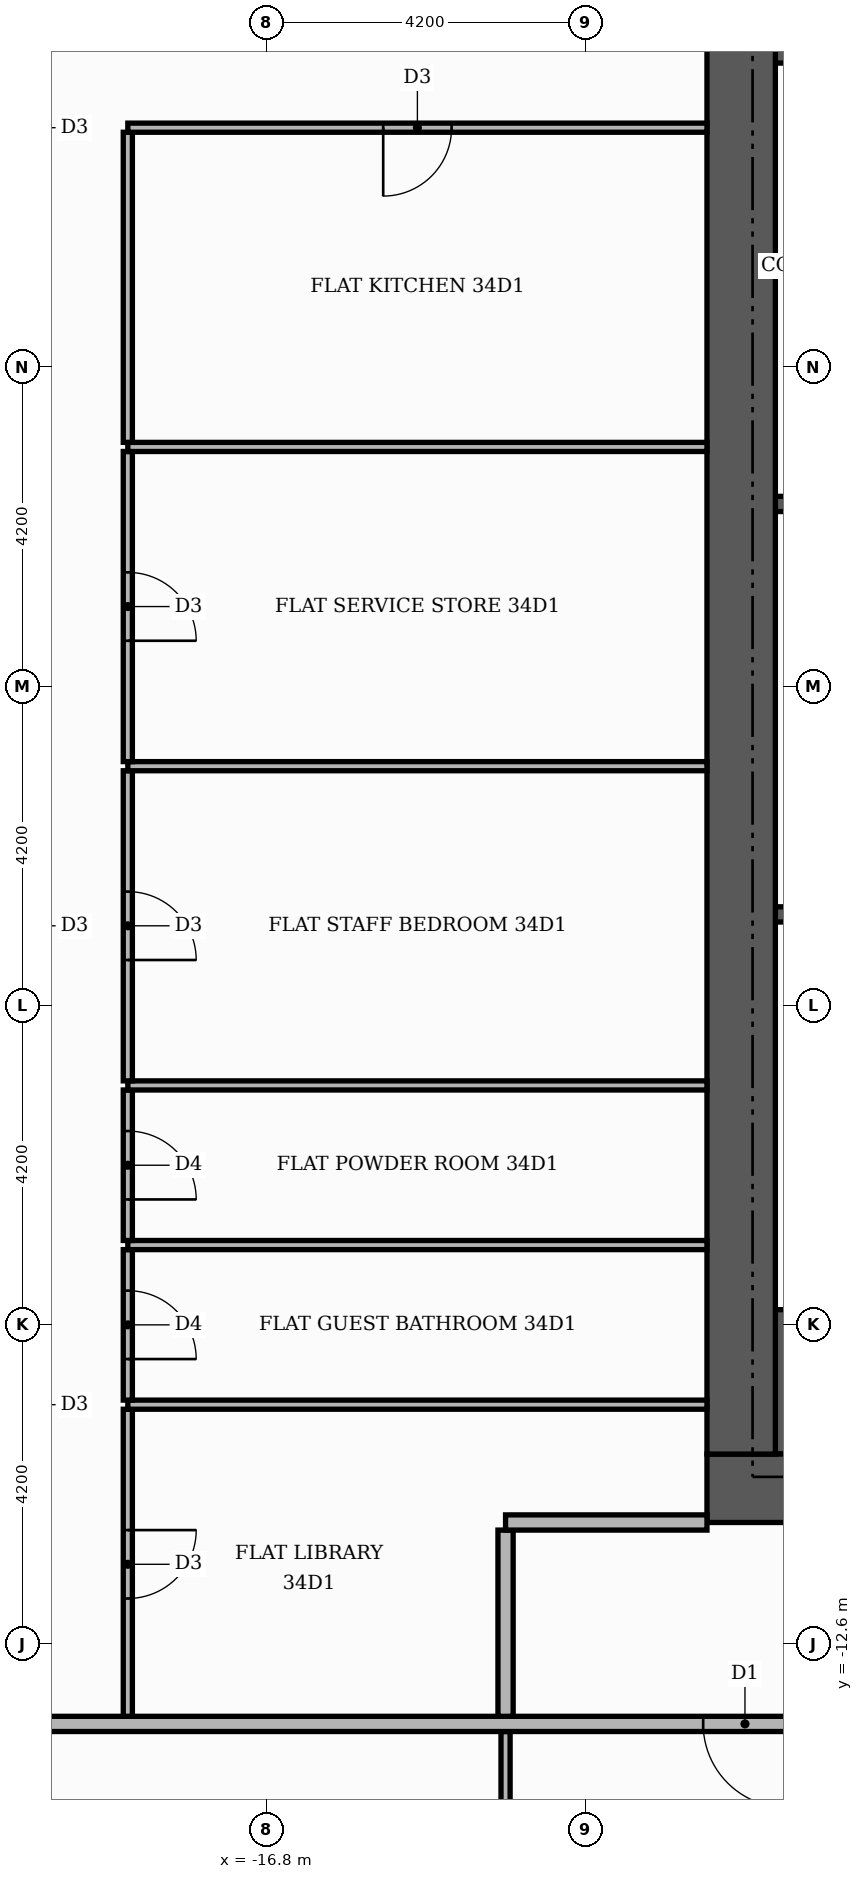
"""IFC4 building model, lengths in metres.
Left out: names, types, materials, properties, quantities, classifications, styles, units other than length and angle.
Written with IfcOpenShell. Run it as: python <this file> out.ifc"""

import sys

from ifc_helpers import new_model, si_unit, direction, frame, frame_2d, origin, place, context, subcontext, project, spatial, rectangle, extrude, element, fill, save


model = new_model("IFC4")
c1 = context("Model", 3, precision=1e-05, world=origin(), true_north=direction((0.0, 1.0)))
c2 = subcontext(c1, "Body", "Model", "MODEL_VIEW")
j1 = project(units=[si_unit("LENGTHUNIT", "METRE"), si_unit("PLANEANGLEUNIT", "RADIAN")], contexts=[c1])
p1 = place(None, origin())
s1 = spatial("IfcSite", under=j1, at=p1, CompositionType="ELEMENT")
p2 = place(p1, origin())
s2 = spatial("IfcBuilding", under=s1, at=p2, CompositionType="ELEMENT")
p3 = place(p2, frame((0.0, 0.0, 145.5)))
s3 = spatial("IfcBuildingStorey", under=s2, at=p3, CompositionType="ELEMENT", Elevation=145.5)
for number, where, z_axis, x_axis in (
    (1, (-10.1, -9.15, 0.0), (0.0, 0.0, 1.0), (1.0, 0.0, 0.0)),
    (2, (-10.1, 9.15, 0.0), (0.0, 0.0, 1.0), (1.0, 0.0, 0.0)),
):
    element("IfcWall", number, at=place(p3, frame(where, z_axis=z_axis, x_axis=x_axis)), inside=s3, PredefinedType="SHEAR", context=c2, shape_type="SweptSolid", body=[
        extrude(rectangle(XDim=4.6, YDim=1.9, at=frame_2d((2.3, 0.0))), origin(), (0.0, 0.0, 1.0), 3.48),
    ])
for number, where, z_axis, x_axis in (
    (3, (-10.1, -3.0, 0.0), (0.0, 0.0, 1.0), (1.0, 0.0, 0.0)),
    (4, (-10.1, 2.4, 0.0), (0.0, 0.0, 1.0), (1.0, 0.0, 0.0)),
):
    element("IfcWall", number, at=place(p3, frame(where, z_axis=z_axis, x_axis=x_axis)), inside=s3, PredefinedType="SHEAR", context=c2, shape_type="SweptSolid", body=[
        extrude(rectangle(XDim=0.9, YDim=0.2, at=frame_2d((0.45, 0.0))), origin(), (0.0, 0.0, 1.0), 3.48),
    ])
p4 = place(p3, frame((-11.0, -10.55, 0.0), z_axis=(0.0, 0.0, 1.0), x_axis=(1.0, 0.0, 0.0)))
e5 = element("IfcWall", 5, at=p4, inside=s3, PredefinedType="SHEAR", context=c2, shape_type="SweptSolid", body=[
    extrude(rectangle(XDim=22.0, YDim=0.9, at=frame_2d((11.0, 0.0))), origin(), (0.0, 0.0, 1.0), 3.48),
])
p5 = place(p4, frame((7.4, 0.0, 0.0)))
e6 = element("IfcOpeningElement", 6, at=p5, cuts=e5, PredefinedType="OPENING", context=c2, shape_type="SweptSolid", body=[
    extrude(rectangle(XDim=1.8, YDim=2.2, at=frame_2d((0.9, 1.1))), frame((0.0, 0.46, 0.0), z_axis=(0.0, -1.0, 0.0), x_axis=(1.0, 0.0, 0.0)), (0.0, 0.0, 1.0), 0.92),
])
p6 = place(p3, frame((-10.55, -10.1, 0.0), z_axis=(0.0, 0.0, 1.0), x_axis=(0.0, 1.0, 0.0)))
e7 = element("IfcWall", 7, at=p6, inside=s3, PredefinedType="SHEAR", context=c2, shape_type="SweptSolid", body=[
    extrude(rectangle(XDim=20.2, YDim=0.9, at=frame_2d((10.1, 0.0))), origin(), (0.0, 0.0, 1.0), 3.48),
])
p7 = place(p3, frame((-13.65, -20.66, 0.0), z_axis=(0.0, 0.0, 1.0), x_axis=(0.0, 1.0, 0.0)))
e8 = element("IfcWall", 8, at=p7, inside=s3, PredefinedType="PARTITIONING", context=c2, shape_type="SweptSolid", body=[
    extrude(rectangle(XDim=6.91, YDim=0.12, at=frame_2d((3.455, 0.0))), origin(), (0.0, 0.0, 1.0), 3.48),
])
p8 = place(p7, frame((3.025, 0.0, 0.0)))
e9 = element("IfcOpeningElement", 9, at=p8, cuts=e8, PredefinedType="OPENING", context=c2, shape_type="SweptSolid", body=[
    extrude(rectangle(XDim=0.9, YDim=2.1, at=frame_2d((0.45, 1.05))), frame((0.0, 0.07, 0.0), z_axis=(0.0, -1.0, 0.0), x_axis=(1.0, 0.0, 0.0)), (0.0, 0.0, 1.0), 0.14),
])
p9 = place(p3, frame((-25.42, -13.65, 0.0), z_axis=(0.0, 0.0, 1.0), x_axis=(1.0, 0.0, 0.0)))
e10 = element("IfcWall", 10, at=p9, inside=s3, PredefinedType="PARTITIONING", context=c2, shape_type="SweptSolid", body=[
    extrude(rectangle(XDim=39.07, YDim=0.2, at=frame_2d((19.535, 0.0))), origin(), (0.0, 0.0, 1.0), 3.48),
])
p10 = place(p9, frame((14.37, 0.0, 0.0)))
e11 = element("IfcOpeningElement", 11, at=p10, cuts=e10, PredefinedType="OPENING", context=c2, shape_type="SweptSolid", body=[
    extrude(rectangle(XDim=1.1, YDim=2.4, at=frame_2d((0.55, 1.2))), frame((0.0, 0.11, 0.0), z_axis=(0.0, -1.0, 0.0), x_axis=(1.0, 0.0, 0.0)), (0.0, 0.0, 1.0), 0.22),
])
p11 = place(p3, frame((-18.62, -13.55, 0.0), z_axis=(0.0, 0.0, 1.0), x_axis=(0.0, 1.0, 0.0)))
e12 = element("IfcWall", 12, at=p11, inside=s3, PredefinedType="PARTITIONING", context=c2, shape_type="SweptSolid", body=[
    extrude(rectangle(XDim=4.04, YDim=0.12, at=frame_2d((2.02, 0.0))), origin(), (0.0, 0.0, 1.0), 3.48),
])
p12 = place(p11, frame((1.55, 0.0, 0.0)))
e13 = element("IfcOpeningElement", 13, at=p12, cuts=e12, PredefinedType="OPENING", context=c2, shape_type="SweptSolid", body=[
    extrude(rectangle(XDim=0.9, YDim=2.1, at=frame_2d((0.45, 1.05))), frame((0.0, 0.07, 0.0), z_axis=(0.0, -1.0, 0.0), x_axis=(1.0, 0.0, 0.0)), (0.0, 0.0, 1.0), 0.14),
])
p13 = place(p3, frame((-13.65, -13.55, 0.0), z_axis=(0.0, 0.0, 1.0), x_axis=(0.0, 1.0, 0.0)))
e14 = element("IfcWall", 14, at=p13, inside=s3, PredefinedType="PARTITIONING", context=c2, shape_type="SweptSolid", body=[
    extrude(rectangle(XDim=2.45, YDim=0.2, at=frame_2d((1.225, 0.0))), origin(), (0.0, 0.0, 1.0), 3.48),
])
p14 = place(p3, frame((-13.65, -11.0, 0.0), z_axis=(0.0, 0.0, 1.0), x_axis=(1.0, 0.0, 0.0)))
e15 = element("IfcWall", 15, at=p14, inside=s3, PredefinedType="PARTITIONING", context=c2, shape_type="SweptSolid", body=[
    extrude(rectangle(XDim=2.65, YDim=0.2, at=frame_2d((1.325, 0.0))), origin(), (0.0, 0.0, 1.0), 3.48),
])
p15 = place(p3, frame((-18.62, -9.45, 0.0), z_axis=(0.0, 0.0, 1.0), x_axis=(1.0, 0.0, 0.0)))
e16 = element("IfcWall", 16, at=p15, inside=s3, PredefinedType="PARTITIONING", context=c2, shape_type="SweptSolid", body=[
    extrude(rectangle(XDim=7.62, YDim=0.12, at=frame_2d((3.81, 0.0))), origin(), (0.0, 0.0, 1.0), 3.48),
])
p16 = place(p3, frame((-18.62, -9.39, 0.0), z_axis=(0.0, 0.0, 1.0), x_axis=(0.0, 1.0, 0.0)))
e17 = element("IfcWall", 17, at=p16, inside=s3, PredefinedType="PARTITIONING", context=c2, shape_type="SweptSolid", body=[
    extrude(rectangle(XDim=1.98, YDim=0.12, at=frame_2d((0.99, 0.0))), origin(), (0.0, 0.0, 1.0), 3.48),
])
p17 = place(p16, frame((0.54, 0.0, 0.0)))
e18 = element("IfcOpeningElement", 18, at=p17, cuts=e17, PredefinedType="OPENING", context=c2, shape_type="SweptSolid", body=[
    extrude(rectangle(XDim=0.9, YDim=2.1, at=frame_2d((0.45, 1.05))), frame((0.0, 0.07, 0.0), z_axis=(0.0, -1.0, 0.0), x_axis=(1.0, 0.0, 0.0)), (0.0, 0.0, 1.0), 0.14),
])
p18 = place(p3, frame((-18.62, -7.35, 0.0), z_axis=(0.0, 0.0, 1.0), x_axis=(1.0, 0.0, 0.0)))
e19 = element("IfcWall", 19, at=p18, inside=s3, PredefinedType="PARTITIONING", context=c2, shape_type="SweptSolid", body=[
    extrude(rectangle(XDim=7.62, YDim=0.12, at=frame_2d((3.81, 0.0))), origin(), (0.0, 0.0, 1.0), 3.48),
])
p19 = place(p3, frame((-18.62, -7.29, 0.0), z_axis=(0.0, 0.0, 1.0), x_axis=(0.0, 1.0, 0.0)))
e20 = element("IfcWall", 20, at=p19, inside=s3, PredefinedType="PARTITIONING", context=c2, shape_type="SweptSolid", body=[
    extrude(rectangle(XDim=1.98, YDim=0.12, at=frame_2d((0.99, 0.0))), origin(), (0.0, 0.0, 1.0), 3.48),
])
p20 = place(p19, frame((0.54, 0.0, 0.0)))
e21 = element("IfcOpeningElement", 21, at=p20, cuts=e20, PredefinedType="OPENING", context=c2, shape_type="SweptSolid", body=[
    extrude(rectangle(XDim=0.9, YDim=2.1, at=frame_2d((0.45, 1.05))), frame((0.0, 0.07, 0.0), z_axis=(0.0, -1.0, 0.0), x_axis=(1.0, 0.0, 0.0)), (0.0, 0.0, 1.0), 0.14),
])
p21 = place(p3, frame((-18.62, -5.25, 0.0), z_axis=(0.0, 0.0, 1.0), x_axis=(1.0, 0.0, 0.0)))
e22 = element("IfcWall", 22, at=p21, inside=s3, PredefinedType="PARTITIONING", context=c2, shape_type="SweptSolid", body=[
    extrude(rectangle(XDim=7.62, YDim=0.12, at=frame_2d((3.81, 0.0))), origin(), (0.0, 0.0, 1.0), 3.48),
])
p22 = place(p3, frame((-18.62, -5.19, 0.0), z_axis=(0.0, 0.0, 1.0), x_axis=(0.0, 1.0, 0.0)))
e23 = element("IfcWall", 23, at=p22, inside=s3, PredefinedType="PARTITIONING", context=c2, shape_type="SweptSolid", body=[
    extrude(rectangle(XDim=4.08, YDim=0.12, at=frame_2d((2.04, 0.0))), origin(), (0.0, 0.0, 1.0), 3.48),
])
p23 = place(p22, frame((1.59, 0.0, 0.0)))
e24 = element("IfcOpeningElement", 24, at=p23, cuts=e23, PredefinedType="OPENING", context=c2, shape_type="SweptSolid", body=[
    extrude(rectangle(XDim=0.9, YDim=2.1, at=frame_2d((0.45, 1.05))), frame((0.0, 0.07, 0.0), z_axis=(0.0, -1.0, 0.0), x_axis=(1.0, 0.0, 0.0)), (0.0, 0.0, 1.0), 0.14),
])
p24 = place(p3, frame((-18.62, -1.05, 0.0), z_axis=(0.0, 0.0, 1.0), x_axis=(1.0, 0.0, 0.0)))
e25 = element("IfcWall", 25, at=p24, inside=s3, PredefinedType="PARTITIONING", context=c2, shape_type="SweptSolid", body=[
    extrude(rectangle(XDim=7.62, YDim=0.12, at=frame_2d((3.81, 0.0))), origin(), (0.0, 0.0, 1.0), 3.48),
])
p25 = place(p3, frame((-18.62, -0.99, 0.0), z_axis=(0.0, 0.0, 1.0), x_axis=(0.0, 1.0, 0.0)))
e26 = element("IfcWall", 26, at=p25, inside=s3, PredefinedType="PARTITIONING", context=c2, shape_type="SweptSolid", body=[
    extrude(rectangle(XDim=4.08, YDim=0.12, at=frame_2d((2.04, 0.0))), origin(), (0.0, 0.0, 1.0), 3.48),
])
p26 = place(p25, frame((1.59, 0.0, 0.0)))
e27 = element("IfcOpeningElement", 27, at=p26, cuts=e26, PredefinedType="OPENING", context=c2, shape_type="SweptSolid", body=[
    extrude(rectangle(XDim=0.9, YDim=2.1, at=frame_2d((0.45, 1.05))), frame((0.0, 0.07, 0.0), z_axis=(0.0, -1.0, 0.0), x_axis=(1.0, 0.0, 0.0)), (0.0, 0.0, 1.0), 0.14),
])
p27 = place(p3, frame((-18.62, 3.15, 0.0), z_axis=(0.0, 0.0, 1.0), x_axis=(1.0, 0.0, 0.0)))
e28 = element("IfcWall", 28, at=p27, inside=s3, PredefinedType="PARTITIONING", context=c2, shape_type="SweptSolid", body=[
    extrude(rectangle(XDim=7.62, YDim=0.12, at=frame_2d((3.81, 0.0))), origin(), (0.0, 0.0, 1.0), 3.48),
])
p28 = place(p3, frame((-18.62, 3.21, 0.0), z_axis=(0.0, 0.0, 1.0), x_axis=(0.0, 1.0, 0.0)))
e29 = element("IfcWall", 29, at=p28, inside=s3, PredefinedType="PARTITIONING", context=c2, shape_type="SweptSolid", body=[
    extrude(rectangle(XDim=4.08, YDim=0.12, at=frame_2d((2.04, 0.0))), origin(), (0.0, 0.0, 1.0), 3.48),
])
p29 = place(p3, frame((-18.62, 7.35, 0.0), z_axis=(0.0, 0.0, 1.0), x_axis=(1.0, 0.0, 0.0)))
e30 = element("IfcWall", 30, at=p29, inside=s3, PredefinedType="PARTITIONING", context=c2, shape_type="SweptSolid", body=[
    extrude(rectangle(XDim=7.62, YDim=0.12, at=frame_2d((3.81, 0.0))), origin(), (0.0, 0.0, 1.0), 3.48),
])
p30 = place(p29, frame((3.36, 0.0, 0.0)))
e31 = element("IfcOpeningElement", 31, at=p30, cuts=e30, PredefinedType="OPENING", context=c2, shape_type="SweptSolid", body=[
    extrude(rectangle(XDim=0.9, YDim=2.1, at=frame_2d((0.45, 1.05))), frame((0.0, 0.07, 0.0), z_axis=(0.0, -1.0, 0.0), x_axis=(1.0, 0.0, 0.0)), (0.0, 0.0, 1.0), 0.14),
])
p31 = place(p10, frame((1.1, 0.0, 0.0), z_axis=(0.0, 0.0, 1.0), x_axis=(-1.0, 0.0, 0.0)))
e32 = element("IfcDoor", 32, at=p31, inside=s3, OperationType="SINGLE_SWING_RIGHT", PredefinedType="DOOR", context=c2, shape_type="SweptSolid", body=[
    extrude(rectangle(XDim=1.1, YDim=2.4, at=frame_2d((0.55, 1.2))), frame((0.0, 0.025, 0.0), z_axis=(0.0, -1.0, 0.0), x_axis=(1.0, 0.0, 0.0)), (0.0, 0.0, 1.0), 0.05),
])
fill(e11, e32)
p32 = place(p30, frame((0.9, 0.0, 0.0), z_axis=(0.0, 0.0, 1.0), x_axis=(-1.0, 0.0, 0.0)))
e33 = element("IfcDoor", 33, at=p32, inside=s3, OperationType="SINGLE_SWING_LEFT", PredefinedType="DOOR", context=c2, shape_type="SweptSolid", body=[
    extrude(rectangle(XDim=0.9, YDim=2.1, at=frame_2d((0.45, 1.05))), frame((0.0, 0.025, 0.0), z_axis=(0.0, -1.0, 0.0), x_axis=(1.0, 0.0, 0.0)), (0.0, 0.0, 1.0), 0.05),
])
fill(e31, e33)
p33 = place(p26, frame((0.9, 0.0, 0.0), z_axis=(0.0, 0.0, 1.0), x_axis=(-1.0, 0.0, 0.0)))
e34 = element("IfcDoor", 34, at=p33, inside=s3, OperationType="SINGLE_SWING_LEFT", PredefinedType="DOOR", context=c2, shape_type="SweptSolid", body=[
    extrude(rectangle(XDim=0.9, YDim=2.1, at=frame_2d((0.45, 1.05))), frame((0.0, 0.025, 0.0), z_axis=(0.0, -1.0, 0.0), x_axis=(1.0, 0.0, 0.0)), (0.0, 0.0, 1.0), 0.05),
])
fill(e27, e34)
p34 = place(p23, frame((0.9, 0.0, 0.0), z_axis=(0.0, 0.0, 1.0), x_axis=(-1.0, 0.0, 0.0)))
e35 = element("IfcDoor", 35, at=p34, inside=s3, OperationType="SINGLE_SWING_LEFT", PredefinedType="DOOR", context=c2, shape_type="SweptSolid", body=[
    extrude(rectangle(XDim=0.9, YDim=2.1, at=frame_2d((0.45, 1.05))), frame((0.0, 0.025, 0.0), z_axis=(0.0, -1.0, 0.0), x_axis=(1.0, 0.0, 0.0)), (0.0, 0.0, 1.0), 0.05),
])
fill(e24, e35)
p35 = place(p20, frame((0.9, 0.0, 0.0), z_axis=(0.0, 0.0, 1.0), x_axis=(-1.0, 0.0, 0.0)))
e36 = element("IfcDoor", 36, at=p35, inside=s3, OperationType="SINGLE_SWING_LEFT", PredefinedType="DOOR", context=c2, shape_type="SweptSolid", body=[
    extrude(rectangle(XDim=0.9, YDim=2.1, at=frame_2d((0.45, 1.05))), frame((0.0, 0.025, 0.0), z_axis=(0.0, -1.0, 0.0), x_axis=(1.0, 0.0, 0.0)), (0.0, 0.0, 1.0), 0.05),
])
fill(e21, e36)
p36 = place(p17, frame((0.9, 0.0, 0.0), z_axis=(0.0, 0.0, 1.0), x_axis=(-1.0, 0.0, 0.0)))
e37 = element("IfcDoor", 37, at=p36, inside=s3, OperationType="SINGLE_SWING_LEFT", PredefinedType="DOOR", context=c2, shape_type="SweptSolid", body=[
    extrude(rectangle(XDim=0.9, YDim=2.1, at=frame_2d((0.45, 1.05))), frame((0.0, 0.025, 0.0), z_axis=(0.0, -1.0, 0.0), x_axis=(1.0, 0.0, 0.0)), (0.0, 0.0, 1.0), 0.05),
])
fill(e18, e37)
p37 = place(p12, frame((0.9, 0.0, 0.0), z_axis=(0.0, 0.0, 1.0), x_axis=(-1.0, 0.0, 0.0)))
e38 = element("IfcDoor", 38, at=p37, inside=s3, OperationType="SINGLE_SWING_RIGHT", PredefinedType="DOOR", context=c2, shape_type="SweptSolid", body=[
    extrude(rectangle(XDim=0.9, YDim=2.1, at=frame_2d((0.45, 1.05))), frame((0.0, 0.025, 0.0), z_axis=(0.0, -1.0, 0.0), x_axis=(1.0, 0.0, 0.0)), (0.0, 0.0, 1.0), 0.05),
])
fill(e13, e38)
save(model, sys.argv[1])
